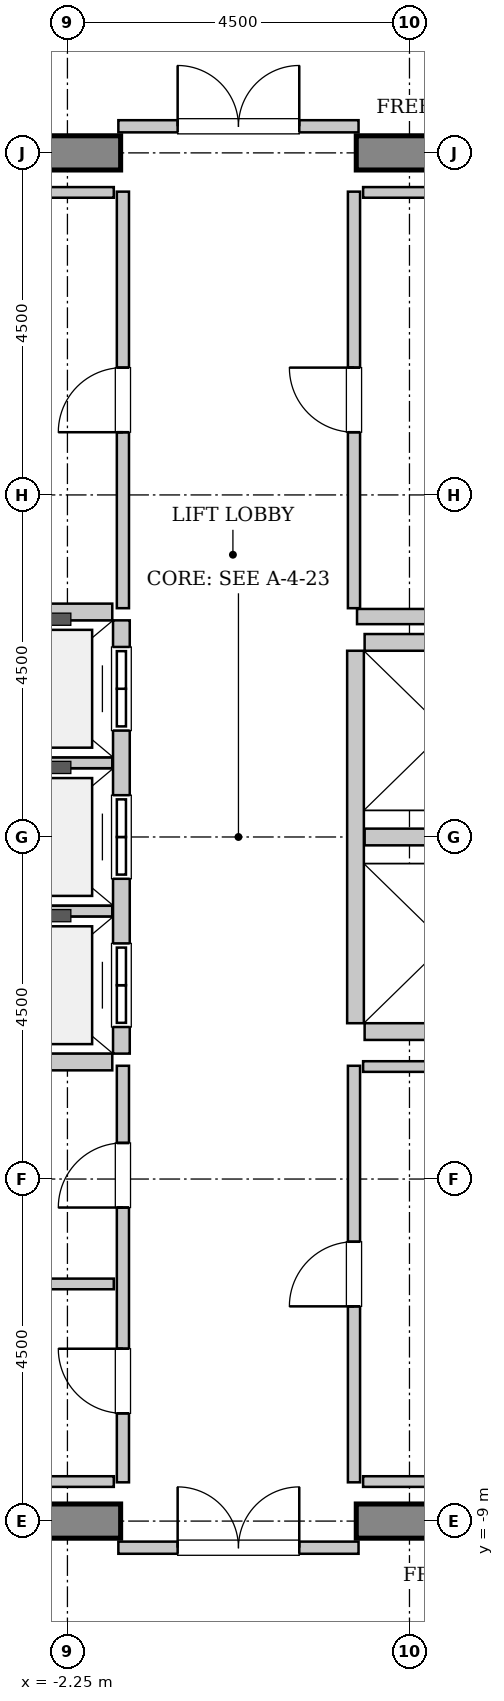
"""IFC4 building model, lengths in metres.
Left out: names, types, materials, properties, quantities, classifications, styles, units other than length and angle.
Written with IfcOpenShell. Run it as: python <this file> out.ifc"""

import sys

from ifc_helpers import new_model, si_unit, direction, frame, frame_2d, origin, place, context, subcontext, project, spatial, rectangle, extrude, source, transform, mapped, element, fill, save


model = new_model("IFC4")
c1 = context("Model", 3, precision=1e-05, world=origin(), true_north=direction((0.0, 1.0)))
c2 = subcontext(c1, "Body", "Model", "MODEL_VIEW")
j1 = project(units=[si_unit("LENGTHUNIT", "METRE"), si_unit("PLANEANGLEUNIT", "RADIAN")], contexts=[c1])
p1 = place(None, origin())
s1 = spatial("IfcSite", under=j1, at=p1, CompositionType="ELEMENT")
p2 = place(p1, origin())
s2 = spatial("IfcBuilding", under=s1, at=p2, CompositionType="ELEMENT")
p3 = place(p2, frame((0.0, 0.0, 272.2)))
s3 = spatial("IfcBuildingStorey", under=s2, at=p3, CompositionType="ELEMENT", Elevation=272.2)
m1 = source(origin(), c2, "Body", "SweptSolid", [
    extrude(rectangle(XDim=9.925, YDim=0.45, at=frame_2d((4.962, 0.0))), origin(), (0.0, 0.0, 1.0), 3.8),
])
for number, where, z_axis, x_axis in (
    (1, (-11.475, 9.0, 0.0), (0.0, 0.0, 1.0), (1.0, 0.0, 0.0)),
    (2, (1.55, 9.0, 0.0), (0.0, 0.0, 1.0), (1.0, 0.0, 0.0)),
    (3, (-11.475, -9.0, 0.0), (0.0, 0.0, 1.0), (1.0, 0.0, 0.0)),
    (4, (1.55, -9.0, 0.0), (0.0, 0.0, 1.0), (1.0, 0.0, 0.0)),
):
    element("IfcWall", number, at=place(p3, frame(where, z_axis=z_axis, x_axis=x_axis)), inside=s3, PredefinedType="SHEAR", context=c2, shape_type="MappedRepresentation", body=[
        mapped(m1, transform((0.0, 0.0, 0.0), x_axis=(1.0, 0.0, 0.0), y_axis=(0.0, 1.0, 0.0), z_axis=(0.0, 0.0, 1.0), scale=1.0)),
    ])
m2 = source(origin(), c2, "Body", "SweptSolid", [
    extrude(rectangle(XDim=5.7, YDim=0.22, at=frame_2d((2.85, 0.0))), origin(), (0.0, 0.0, 1.0), 3.535),
])
p4 = place(p3, frame((-1.54, -2.85, 0.0), z_axis=(0.0, 0.0, 1.0), x_axis=(0.0, 1.0, 0.0)))
e5 = element("IfcWall", 5, at=p4, inside=s3, PredefinedType="SOLIDWALL", context=c2, shape_type="MappedRepresentation", body=[
    mapped(m2, transform((0.0, 0.0, 0.0), x_axis=(1.0, 0.0, 0.0), y_axis=(0.0, 1.0, 0.0), z_axis=(0.0, 0.0, 1.0), scale=1.0)),
])
p5 = place(p4, frame((0.35, 0.0, 0.0)))
e6 = element("IfcOpeningElement", 6, at=p5, cuts=e5, PredefinedType="OPENING", context=c2, shape_type="SweptSolid", body=[
    extrude(rectangle(XDim=1.1, YDim=2.2, at=frame_2d((0.55, 1.1))), frame((0.0, 0.12, 0.0), z_axis=(0.0, -1.0, 0.0), x_axis=(1.0, 0.0, 0.0)), (0.0, 0.0, 1.0), 0.24),
])
p6 = place(p4, frame((2.3, 0.0, 0.0)))
e7 = element("IfcOpeningElement", 7, at=p6, cuts=e5, PredefinedType="OPENING", context=c2, shape_type="SweptSolid", body=[
    extrude(rectangle(XDim=1.1, YDim=2.2, at=frame_2d((0.55, 1.1))), frame((0.0, 0.12, 0.0), z_axis=(0.0, -1.0, 0.0), x_axis=(1.0, 0.0, 0.0)), (0.0, 0.0, 1.0), 0.24),
])
p7 = place(p4, frame((4.25, 0.0, 0.0)))
e8 = element("IfcOpeningElement", 8, at=p7, cuts=e5, PredefinedType="OPENING", context=c2, shape_type="SweptSolid", body=[
    extrude(rectangle(XDim=1.1, YDim=2.2, at=frame_2d((0.55, 1.1))), frame((0.0, 0.12, 0.0), z_axis=(0.0, -1.0, 0.0), x_axis=(1.0, 0.0, 0.0)), (0.0, 0.0, 1.0), 0.24),
])
m3 = source(origin(), c2, "Body", "SweptSolid", [
    extrude(rectangle(XDim=2.13, YDim=0.22, at=frame_2d((1.065, 0.0))), origin(), (0.0, 0.0, 1.0), 3.535),
])
p8 = place(p3, frame((-3.79, -2.96, 0.0), z_axis=(0.0, 0.0, 1.0), x_axis=(1.0, 0.0, 0.0)))
e9 = element("IfcWall", 9, at=p8, inside=s3, PredefinedType="SOLIDWALL", context=c2, shape_type="MappedRepresentation", body=[
    mapped(m3, transform((0.0, 0.0, 0.0), x_axis=(1.0, 0.0, 0.0), y_axis=(0.0, 1.0, 0.0), z_axis=(0.0, 0.0, 1.0), scale=1.0)),
])
m4 = source(origin(), c2, "Body", "SweptSolid", [
    extrude(rectangle(XDim=2.13, YDim=0.14, at=frame_2d((1.065, 0.0))), origin(), (0.0, 0.0, 1.0), 3.535),
])
for number, where, z_axis, x_axis in (
    (10, (-3.79, -0.975, 0.0), (0.0, 0.0, 1.0), (1.0, 0.0, 0.0)),
    (11, (-3.79, 0.975, 0.0), (0.0, 0.0, 1.0), (1.0, 0.0, 0.0)),
):
    element("IfcWall", number, at=place(p3, frame(where, z_axis=z_axis, x_axis=x_axis)), inside=s3, PredefinedType="PARTITIONING", context=c2, shape_type="MappedRepresentation", body=[
        mapped(m4, transform((0.0, 0.0, 0.0), x_axis=(1.0, 0.0, 0.0), y_axis=(0.0, 1.0, 0.0), z_axis=(0.0, 0.0, 1.0), scale=1.0)),
    ])
p9 = place(p3, frame((-1.66, 2.96, 0.0), z_axis=(0.0, 0.0, 1.0), x_axis=(-1.0, 0.0, 0.0)))
e12 = element("IfcWall", 12, at=p9, inside=s3, PredefinedType="SOLIDWALL", context=c2, shape_type="MappedRepresentation", body=[
    mapped(m3, transform((0.0, 0.0, 0.0), x_axis=(1.0, 0.0, 0.0), y_axis=(0.0, 1.0, 0.0), z_axis=(0.0, 0.0, 1.0), scale=1.0)),
])
m5 = source(origin(), c2, "Body", "SweptSolid", [
    extrude(rectangle(XDim=4.9, YDim=0.22, at=frame_2d((2.45, 0.0))), origin(), (0.0, 0.0, 1.0), 3.535),
])
p10 = place(p3, frame((1.54, 2.45, 0.0), z_axis=(0.0, 0.0, 1.0), x_axis=(0.0, -1.0, 0.0)))
e13 = element("IfcWall", 13, at=p10, inside=s3, PredefinedType="SOLIDWALL", context=c2, shape_type="MappedRepresentation", body=[
    mapped(m5, transform((0.0, 0.0, 0.0), x_axis=(1.0, 0.0, 0.0), y_axis=(0.0, 1.0, 0.0), z_axis=(0.0, 0.0, 1.0), scale=1.0)),
])
for number, where, z_axis, x_axis in (
    (14, (1.66, -2.56, 0.0), (0.0, 0.0, 1.0), (1.0, 0.0, 0.0)),
    (15, (1.66, 0.0, 0.0), (0.0, 0.0, 1.0), (1.0, 0.0, 0.0)),
    (16, (3.79, 2.56, 0.0), (0.0, 0.0, 1.0), (-1.0, 0.0, 0.0)),
):
    element("IfcWall", number, at=place(p3, frame(where, z_axis=z_axis, x_axis=x_axis)), inside=s3, PredefinedType="SOLIDWALL", context=c2, shape_type="MappedRepresentation", body=[
        mapped(m3, transform((0.0, 0.0, 0.0), x_axis=(1.0, 0.0, 0.0), y_axis=(0.0, 1.0, 0.0), z_axis=(0.0, 0.0, 1.0), scale=1.0)),
    ])
m6 = source(origin(), c2, "Body", "SweptSolid", [
    extrude(rectangle(XDim=2.52, YDim=0.2, at=frame_2d((1.26, 0.0))), origin(), (0.0, 0.0, 1.0), 3.535),
])
p11 = place(p3, frame((1.56, 2.9, 0.0), z_axis=(0.0, 0.0, 1.0), x_axis=(1.0, 0.0, 0.0)))
e17 = element("IfcWall", 17, at=p11, inside=s3, PredefinedType="PARTITIONING", context=c2, shape_type="MappedRepresentation", body=[
    mapped(m6, transform((0.0, 0.0, 0.0), x_axis=(1.0, 0.0, 0.0), y_axis=(0.0, 1.0, 0.0), z_axis=(0.0, 0.0, 1.0), scale=1.0)),
])
m7 = source(origin(), c2, "Body", "SweptSolid", [
    extrude(rectangle(XDim=3.16, YDim=0.16, at=frame_2d((1.58, 0.0))), origin(), (0.0, 0.0, 1.0), 2.625),
])
p12 = place(p3, frame((-1.58, 9.35, 0.0), z_axis=(0.0, 0.0, 1.0), x_axis=(1.0, 0.0, 0.0)))
e18 = element("IfcWall", 18, at=p12, inside=s3, PredefinedType="PARTITIONING", context=c2, shape_type="MappedRepresentation", body=[
    mapped(m7, transform((0.0, 0.0, 0.0), x_axis=(1.0, 0.0, 0.0), y_axis=(0.0, 1.0, 0.0), z_axis=(0.0, 0.0, 1.0), scale=1.0)),
])
p13 = place(p12, frame((0.78, 0.0, 0.0)))
e19 = element("IfcOpeningElement", 19, at=p13, cuts=e18, PredefinedType="OPENING", context=c2, shape_type="SweptSolid", body=[
    extrude(rectangle(XDim=1.6, YDim=2.3, at=frame_2d((0.8, 1.15))), frame((0.0, 0.09, 0.0), z_axis=(0.0, -1.0, 0.0), x_axis=(1.0, 0.0, 0.0)), (0.0, 0.0, 1.0), 0.18),
])
p14 = place(p3, frame((-1.58, -9.35, 0.0), z_axis=(0.0, 0.0, 1.0), x_axis=(1.0, 0.0, 0.0)))
e20 = element("IfcWall", 20, at=p14, inside=s3, PredefinedType="PARTITIONING", context=c2, shape_type="MappedRepresentation", body=[
    mapped(m7, transform((0.0, 0.0, 0.0), x_axis=(1.0, 0.0, 0.0), y_axis=(0.0, 1.0, 0.0), z_axis=(0.0, 0.0, 1.0), scale=1.0)),
])
p15 = place(p14, frame((0.78, 0.0, 0.0)))
e21 = element("IfcOpeningElement", 21, at=p15, cuts=e20, PredefinedType="OPENING", context=c2, shape_type="SweptSolid", body=[
    extrude(rectangle(XDim=1.6, YDim=2.3, at=frame_2d((0.8, 1.15))), frame((0.0, 0.09, 0.0), z_axis=(0.0, -1.0, 0.0), x_axis=(1.0, 0.0, 0.0)), (0.0, 0.0, 1.0), 0.18),
])
m8 = source(origin(), c2, "Body", "SweptSolid", [
    extrude(rectangle(XDim=5.48, YDim=0.16, at=frame_2d((2.74, 0.0))), origin(), (0.0, 0.0, 1.0), 3.535),
])
p16 = place(p3, frame((-1.52, 3.01, 0.0), z_axis=(0.0, 0.0, 1.0), x_axis=(0.0, 1.0, 0.0)))
e22 = element("IfcWall", 22, at=p16, inside=s3, PredefinedType="PARTITIONING", context=c2, shape_type="MappedRepresentation", body=[
    mapped(m8, transform((0.0, 0.0, 0.0), x_axis=(1.0, 0.0, 0.0), y_axis=(0.0, 1.0, 0.0), z_axis=(0.0, 0.0, 1.0), scale=1.0)),
])
p17 = place(p16, frame((2.315, 0.0, 0.0)))
e23 = element("IfcOpeningElement", 23, at=p17, cuts=e22, PredefinedType="OPENING", context=c2, shape_type="SweptSolid", body=[
    extrude(rectangle(XDim=0.85, YDim=2.1, at=frame_2d((0.425, 1.05))), frame((0.0, 0.09, 0.0), z_axis=(0.0, -1.0, 0.0), x_axis=(1.0, 0.0, 0.0)), (0.0, 0.0, 1.0), 0.18),
])
m9 = source(origin(), c2, "Body", "SweptSolid", [
    extrude(rectangle(XDim=3.15, YDim=0.14, at=frame_2d((1.575, 0.0))), origin(), (0.0, 0.0, 1.0), 3.535),
])
p18 = place(p3, frame((-4.79, 8.48, 0.0), z_axis=(0.0, 0.0, 1.0), x_axis=(1.0, 0.0, 0.0)))
e24 = element("IfcWall", 24, at=p18, inside=s3, PredefinedType="PARTITIONING", context=c2, shape_type="MappedRepresentation", body=[
    mapped(m9, transform((0.0, 0.0, 0.0), x_axis=(1.0, 0.0, 0.0), y_axis=(0.0, 1.0, 0.0), z_axis=(0.0, 0.0, 1.0), scale=1.0)),
])
p19 = place(p3, frame((-1.52, -8.49, 0.0), z_axis=(0.0, 0.0, 1.0), x_axis=(0.0, 1.0, 0.0)))
e25 = element("IfcWall", 25, at=p19, inside=s3, PredefinedType="PARTITIONING", context=c2, shape_type="MappedRepresentation", body=[
    mapped(m8, transform((0.0, 0.0, 0.0), x_axis=(1.0, 0.0, 0.0), y_axis=(0.0, 1.0, 0.0), z_axis=(0.0, 0.0, 1.0), scale=1.0)),
])
p20 = place(p19, frame((0.907, 0.0, 0.0)))
e26 = element("IfcOpeningElement", 26, at=p20, cuts=e25, PredefinedType="OPENING", context=c2, shape_type="SweptSolid", body=[
    extrude(rectangle(XDim=0.85, YDim=2.1, at=frame_2d((0.425, 1.05))), frame((0.0, 0.09, 0.0), z_axis=(0.0, -1.0, 0.0), x_axis=(1.0, 0.0, 0.0)), (0.0, 0.0, 1.0), 0.18),
])
p21 = place(p19, frame((3.615, 0.0, 0.0)))
e27 = element("IfcOpeningElement", 27, at=p21, cuts=e25, PredefinedType="OPENING", context=c2, shape_type="SweptSolid", body=[
    extrude(rectangle(XDim=0.85, YDim=2.1, at=frame_2d((0.425, 1.05))), frame((0.0, 0.09, 0.0), z_axis=(0.0, -1.0, 0.0), x_axis=(1.0, 0.0, 0.0)), (0.0, 0.0, 1.0), 0.18),
])
m10 = source(origin(), c2, "Body", "SweptSolid", [
    extrude(rectangle(XDim=5.55, YDim=0.14, at=frame_2d((2.775, 0.0))), origin(), (0.0, 0.0, 1.0), 3.535),
])
p22 = place(p3, frame((-7.19, -5.88, 0.0), z_axis=(0.0, 0.0, 1.0), x_axis=(1.0, 0.0, 0.0)))
e28 = element("IfcWall", 28, at=p22, inside=s3, PredefinedType="PARTITIONING", context=c2, shape_type="MappedRepresentation", body=[
    mapped(m10, transform((0.0, 0.0, 0.0), x_axis=(1.0, 0.0, 0.0), y_axis=(0.0, 1.0, 0.0), z_axis=(0.0, 0.0, 1.0), scale=1.0)),
])
p23 = place(p3, frame((1.52, 3.01, 0.0), z_axis=(0.0, 0.0, 1.0), x_axis=(0.0, 1.0, 0.0)))
e29 = element("IfcWall", 29, at=p23, inside=s3, PredefinedType="PARTITIONING", context=c2, shape_type="MappedRepresentation", body=[
    mapped(m8, transform((0.0, 0.0, 0.0), x_axis=(1.0, 0.0, 0.0), y_axis=(0.0, 1.0, 0.0), z_axis=(0.0, 0.0, 1.0), scale=1.0)),
])
p24 = place(p23, frame((2.315, 0.0, 0.0)))
e30 = element("IfcOpeningElement", 30, at=p24, cuts=e29, PredefinedType="OPENING", context=c2, shape_type="SweptSolid", body=[
    extrude(rectangle(XDim=0.85, YDim=2.1, at=frame_2d((0.425, 1.05))), frame((0.0, 0.09, 0.0), z_axis=(0.0, -1.0, 0.0), x_axis=(1.0, 0.0, 0.0)), (0.0, 0.0, 1.0), 0.18),
])
for number, where, z_axis, x_axis in (
    (31, (1.64, 8.48, 0.0), (0.0, 0.0, 1.0), (1.0, 0.0, 0.0)),
    (32, (-4.79, -8.48, 0.0), (0.0, 0.0, 1.0), (1.0, 0.0, 0.0)),
):
    element("IfcWall", number, at=place(p3, frame(where, z_axis=z_axis, x_axis=x_axis)), inside=s3, PredefinedType="PARTITIONING", context=c2, shape_type="MappedRepresentation", body=[
        mapped(m9, transform((0.0, 0.0, 0.0), x_axis=(1.0, 0.0, 0.0), y_axis=(0.0, 1.0, 0.0), z_axis=(0.0, 0.0, 1.0), scale=1.0)),
    ])
p25 = place(p3, frame((1.52, -8.49, 0.0), z_axis=(0.0, 0.0, 1.0), x_axis=(0.0, 1.0, 0.0)))
e33 = element("IfcWall", 33, at=p25, inside=s3, PredefinedType="PARTITIONING", context=c2, shape_type="MappedRepresentation", body=[
    mapped(m8, transform((0.0, 0.0, 0.0), x_axis=(1.0, 0.0, 0.0), y_axis=(0.0, 1.0, 0.0), z_axis=(0.0, 0.0, 1.0), scale=1.0)),
])
p26 = place(p25, frame((2.315, 0.0, 0.0)))
e34 = element("IfcOpeningElement", 34, at=p26, cuts=e33, PredefinedType="OPENING", context=c2, shape_type="SweptSolid", body=[
    extrude(rectangle(XDim=0.85, YDim=2.1, at=frame_2d((0.425, 1.05))), frame((0.0, 0.09, 0.0), z_axis=(0.0, -1.0, 0.0), x_axis=(1.0, 0.0, 0.0)), (0.0, 0.0, 1.0), 0.18),
])
for number, where, z_axis, x_axis in (
    (35, (1.64, -3.02, 0.0), (0.0, 0.0, 1.0), (1.0, 0.0, 0.0)),
    (36, (1.64, -8.48, 0.0), (0.0, 0.0, 1.0), (1.0, 0.0, 0.0)),
):
    element("IfcWall", number, at=place(p3, frame(where, z_axis=z_axis, x_axis=x_axis)), inside=s3, PredefinedType="PARTITIONING", context=c2, shape_type="MappedRepresentation", body=[
        mapped(m9, transform((0.0, 0.0, 0.0), x_axis=(1.0, 0.0, 0.0), y_axis=(0.0, 1.0, 0.0), z_axis=(0.0, 0.0, 1.0), scale=1.0)),
    ])
m11 = source(origin(), c2, "Body", "SweptSolid", [
    extrude(rectangle(XDim=1.1, YDim=2.2, at=frame_2d((0.55, 1.1))), frame((0.0, 0.025, 0.0), z_axis=(0.0, -1.0, 0.0), x_axis=(1.0, 0.0, 0.0)), (0.0, 0.0, 1.0), 0.05),
])
p27 = place(p5, origin())
e37 = element("IfcDoor", 37, at=p27, inside=s3, OperationType="DOUBLE_DOOR_SLIDING", PredefinedType="DOOR", context=c2, shape_type="MappedRepresentation", body=[
    mapped(m11, transform((0.0, 0.0, 0.0), x_axis=(1.0, 0.0, 0.0), y_axis=(0.0, 1.0, 0.0), z_axis=(0.0, 0.0, 1.0), scale=1.0)),
])
fill(e6, e37)
p28 = place(p6, origin())
e38 = element("IfcDoor", 38, at=p28, inside=s3, OperationType="DOUBLE_DOOR_SLIDING", PredefinedType="DOOR", context=c2, shape_type="MappedRepresentation", body=[
    mapped(m11, transform((0.0, 0.0, 0.0), x_axis=(1.0, 0.0, 0.0), y_axis=(0.0, 1.0, 0.0), z_axis=(0.0, 0.0, 1.0), scale=1.0)),
])
fill(e7, e38)
p29 = place(p7, origin())
e39 = element("IfcDoor", 39, at=p29, inside=s3, OperationType="DOUBLE_DOOR_SLIDING", PredefinedType="DOOR", context=c2, shape_type="MappedRepresentation", body=[
    mapped(m11, transform((0.0, 0.0, 0.0), x_axis=(1.0, 0.0, 0.0), y_axis=(0.0, 1.0, 0.0), z_axis=(0.0, 0.0, 1.0), scale=1.0)),
])
fill(e8, e39)
m12 = source(origin(), c2, "Body", "SweptSolid", [
    extrude(rectangle(XDim=1.6, YDim=2.3, at=frame_2d((0.8, 1.15))), frame((0.0, 0.025, 0.0), z_axis=(0.0, -1.0, 0.0), x_axis=(1.0, 0.0, 0.0)), (0.0, 0.0, 1.0), 0.05),
])
p30 = place(p13, origin())
e40 = element("IfcDoor", 40, at=p30, inside=s3, OperationType="DOUBLE_DOOR_SINGLE_SWING", PredefinedType="DOOR", context=c2, shape_type="MappedRepresentation", body=[
    mapped(m12, transform((0.0, 0.0, 0.0), x_axis=(1.0, 0.0, 0.0), y_axis=(0.0, 1.0, 0.0), z_axis=(0.0, 0.0, 1.0), scale=1.0)),
])
fill(e19, e40)
p31 = place(p15, origin())
e41 = element("IfcDoor", 41, at=p31, inside=s3, OperationType="DOUBLE_DOOR_SINGLE_SWING", PredefinedType="DOOR", context=c2, shape_type="MappedRepresentation", body=[
    mapped(m12, transform((0.0, 0.0, 0.0), x_axis=(1.0, 0.0, 0.0), y_axis=(0.0, 1.0, 0.0), z_axis=(0.0, 0.0, 1.0), scale=1.0)),
])
fill(e21, e41)
m13 = source(origin(), c2, "Body", "SweptSolid", [
    extrude(rectangle(XDim=0.85, YDim=2.1, at=frame_2d((0.425, 1.05))), frame((0.0, 0.025, 0.0), z_axis=(0.0, -1.0, 0.0), x_axis=(1.0, 0.0, 0.0)), (0.0, 0.0, 1.0), 0.05),
])
p32 = place(p17, origin())
e42 = element("IfcDoor", 42, at=p32, inside=s3, OperationType="SINGLE_SWING_LEFT", PredefinedType="DOOR", context=c2, shape_type="MappedRepresentation", body=[
    mapped(m13, transform((0.0, 0.0, 0.0), x_axis=(1.0, 0.0, 0.0), y_axis=(0.0, 1.0, 0.0), z_axis=(0.0, 0.0, 1.0), scale=1.0)),
])
fill(e23, e42)
p33 = place(p20, origin())
e43 = element("IfcDoor", 43, at=p33, inside=s3, OperationType="SINGLE_SWING_RIGHT", PredefinedType="DOOR", context=c2, shape_type="MappedRepresentation", body=[
    mapped(m13, transform((0.0, 0.0, 0.0), x_axis=(1.0, 0.0, 0.0), y_axis=(0.0, 1.0, 0.0), z_axis=(0.0, 0.0, 1.0), scale=1.0)),
])
fill(e26, e43)
p34 = place(p21, origin())
e44 = element("IfcDoor", 44, at=p34, inside=s3, OperationType="SINGLE_SWING_LEFT", PredefinedType="DOOR", context=c2, shape_type="MappedRepresentation", body=[
    mapped(m13, transform((0.0, 0.0, 0.0), x_axis=(1.0, 0.0, 0.0), y_axis=(0.0, 1.0, 0.0), z_axis=(0.0, 0.0, 1.0), scale=1.0)),
])
fill(e27, e44)
p35 = place(p24, origin())
e45 = element("IfcDoor", 45, at=p35, inside=s3, OperationType="SINGLE_SWING_RIGHT", PredefinedType="DOOR", context=c2, shape_type="MappedRepresentation", body=[
    mapped(m13, transform((0.0, 0.0, 0.0), x_axis=(1.0, 0.0, 0.0), y_axis=(0.0, 1.0, 0.0), z_axis=(0.0, 0.0, 1.0), scale=1.0)),
])
fill(e30, e45)
p36 = place(p26, origin())
e46 = element("IfcDoor", 46, at=p36, inside=s3, OperationType="SINGLE_SWING_LEFT", PredefinedType="DOOR", context=c2, shape_type="MappedRepresentation", body=[
    mapped(m13, transform((0.0, 0.0, 0.0), x_axis=(1.0, 0.0, 0.0), y_axis=(0.0, 1.0, 0.0), z_axis=(0.0, 0.0, 1.0), scale=1.0)),
])
fill(e34, e46)
save(model, sys.argv[1])
